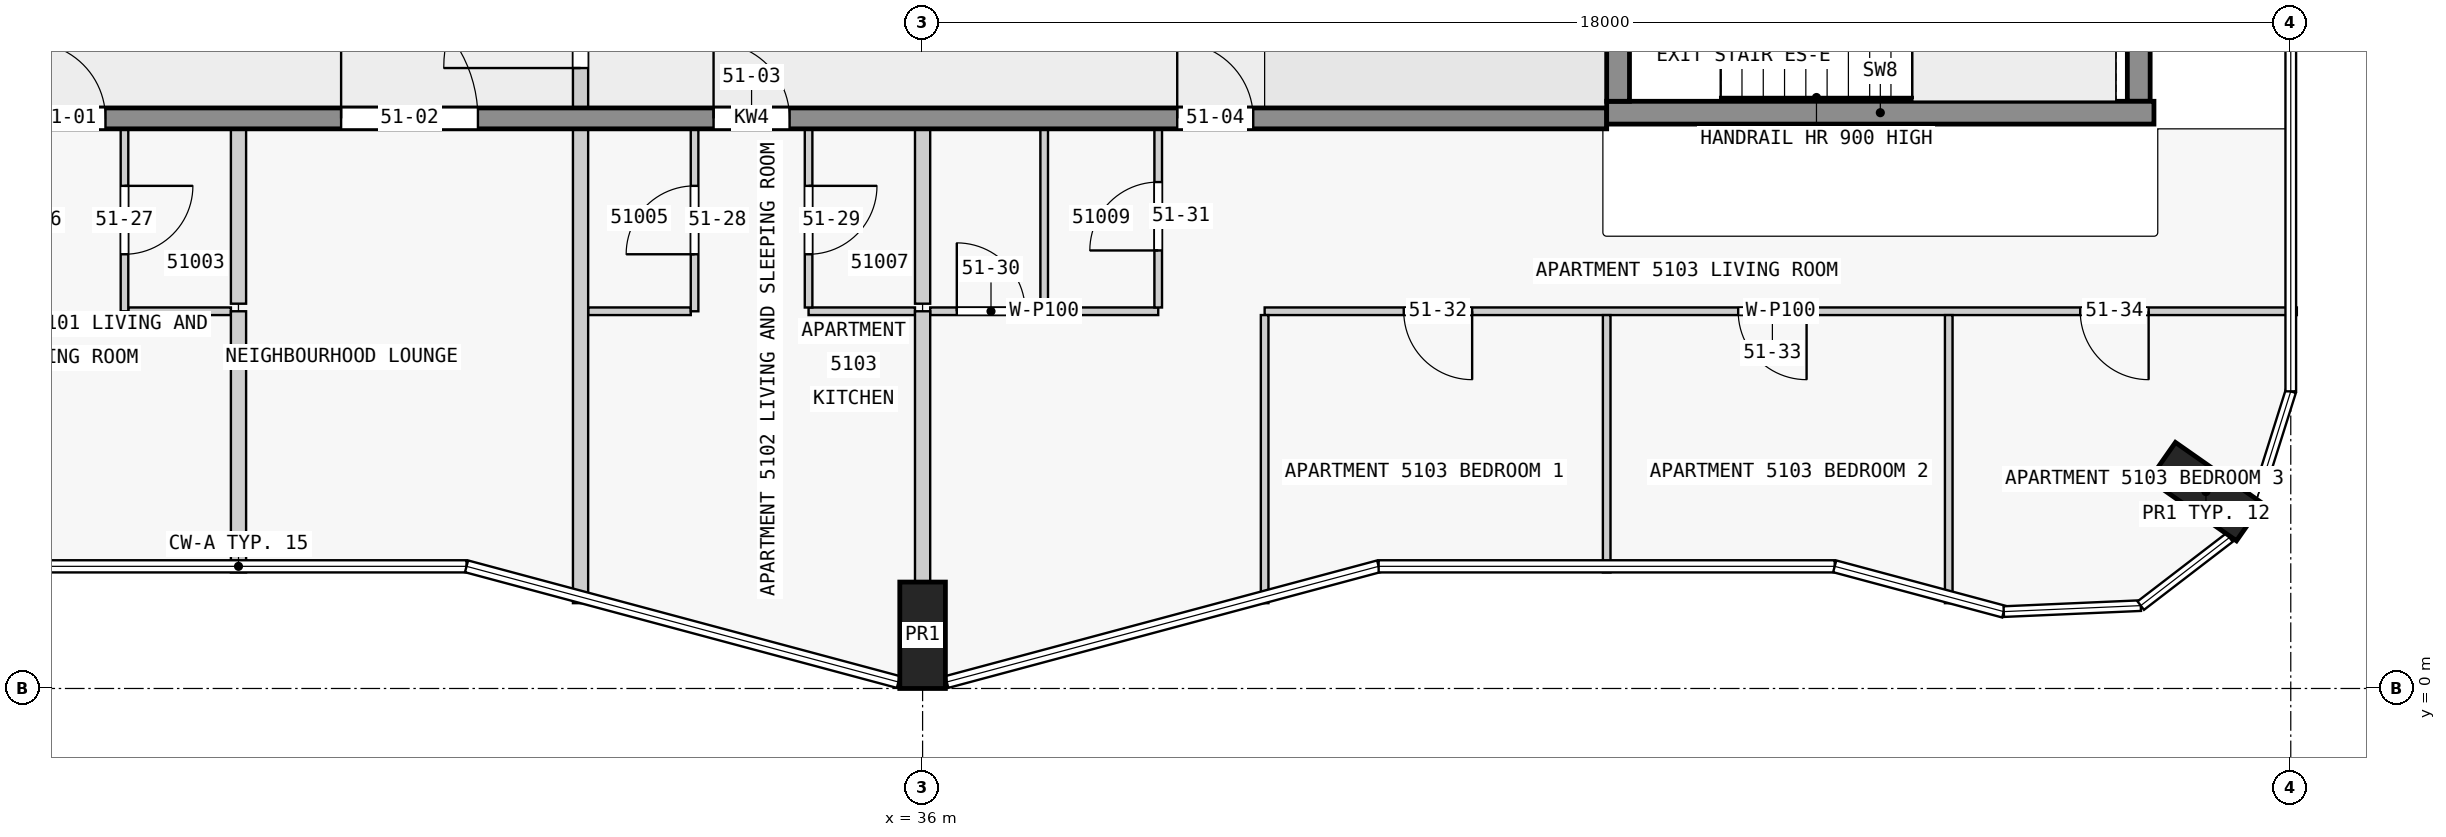
"""IFC4 building model, lengths in metres.
Left out: names, types, materials, properties, quantities, classifications, styles, units other than length and angle.
Written with IfcOpenShell. Run it as: python <this file> out.ifc"""

import sys

from ifc_helpers import new_model, si_unit, direction, frame, frame_2d, origin, origin_2d, place, context, subcontext, project, spatial, rectangle, extrude, element, fill, save


model = new_model("IFC4")
c1 = context("Model", 3, precision=1e-05, world=origin(), true_north=direction((0.0, 1.0)))
c2 = subcontext(c1, "Body", "Model", "MODEL_VIEW")
j1 = project(units=[si_unit("LENGTHUNIT", "METRE"), si_unit("PLANEANGLEUNIT", "RADIAN")], contexts=[c1])
p1 = place(None, origin())
s1 = spatial("IfcSite", under=j1, at=p1, CompositionType="ELEMENT")
p2 = place(p1, origin())
s2 = spatial("IfcBuilding", under=s1, at=p2, CompositionType="ELEMENT")
p3 = place(p2, frame((0.0, 0.0, 197.9)))
s3 = spatial("IfcBuildingStorey", under=s2, at=p3, CompositionType="ELEMENT", Elevation=197.9)
for number, where, z_axis, x_axis in (
    (1, (36.0, 0.7, 0.0), (0.0, 0.0, 1.0), (1.0, 0.0, 0.0)),
    (2, (52.884, 2.59, 0.0), (0.0, 0.0, 1.0), (0.574, 0.819, 0.0)),
):
    element("IfcColumn", number, at=place(p3, frame(where, z_axis=z_axis, x_axis=x_axis)), inside=s3, PredefinedType="COLUMN", context=c2, shape_type="SweptSolid", body=[
        extrude(rectangle(XDim=0.6, YDim=1.4, at=origin_2d()), origin(), (0.0, 0.0, 1.0), 3.5),
    ])
p4 = place(p3, frame((45.15, 7.725, 0.0), z_axis=(0.0, 0.0, 1.0), x_axis=(0.0, 1.0, 0.0)))
e3 = element("IfcWall", 3, at=p4, inside=s3, PredefinedType="SHEAR", context=c2, shape_type="SweptSolid", body=[
    extrude(rectangle(XDim=2.55, YDim=0.3, at=frame_2d((1.275, 0.0))), origin(), (0.0, 0.0, 1.0), 3.5),
])
p5 = place(p4, frame((0.725, 0.0, 0.0)))
e4 = element("IfcOpeningElement", 4, at=p5, cuts=e3, PredefinedType="OPENING", context=c2, shape_type="SweptSolid", body=[
    extrude(rectangle(XDim=1.1, YDim=2.1, at=frame_2d((0.55, 1.05))), frame((0.0, 0.16, 0.0), z_axis=(0.0, -1.0, 0.0), x_axis=(1.0, 0.0, 0.0)), (0.0, 0.0, 1.0), 0.32),
])
p6 = place(p3, frame((52.0, 7.725, 0.0), z_axis=(0.0, 0.0, 1.0), x_axis=(0.0, 1.0, 0.0)))
e5 = element("IfcWall", 5, at=p6, inside=s3, PredefinedType="SHEAR", context=c2, shape_type="SweptSolid", body=[
    extrude(rectangle(XDim=2.55, YDim=0.3, at=frame_2d((1.275, 0.0))), origin(), (0.0, 0.0, 1.0), 3.5),
])
p7 = place(p3, frame((45.0, 7.575, 0.0), z_axis=(0.0, 0.0, 1.0), x_axis=(1.0, 0.0, 0.0)))
e6 = element("IfcWall", 6, at=p7, inside=s3, PredefinedType="SHEAR", context=c2, shape_type="SweptSolid", body=[
    extrude(rectangle(XDim=7.2, YDim=0.3, at=frame_2d((3.6, 0.0))), origin(), (0.0, 0.0, 1.0), 3.5),
])
p8 = place(p3, frame((22.5, 7.5, 0.0), z_axis=(0.0, 0.0, 1.0), x_axis=(1.0, 0.0, 0.0)))
e7 = element("IfcWall", 7, at=p8, inside=s3, PredefinedType="SHEAR", context=c2, shape_type="SweptSolid", body=[
    extrude(rectangle(XDim=22.5, YDim=0.275, at=frame_2d((11.25, 0.0))), origin(), (0.0, 0.0, 1.0), 3.25),
])
p9 = place(p8, frame((1.75, 0.0, 0.0)))
e8 = element("IfcOpeningElement", 8, at=p9, cuts=e7, PredefinedType="OPENING", context=c2, shape_type="SweptSolid", body=[
    extrude(rectangle(XDim=1.0, YDim=2.1, at=frame_2d((0.5, 1.05))), frame((0.0, 0.147, 0.0), z_axis=(0.0, -1.0, 0.0), x_axis=(1.0, 0.0, 0.0)), (0.0, 0.0, 1.0), 0.295),
])
p10 = place(p8, frame((5.85, 0.0, 0.0)))
e9 = element("IfcOpeningElement", 9, at=p10, cuts=e7, PredefinedType="OPENING", context=c2, shape_type="SweptSolid", body=[
    extrude(rectangle(XDim=1.8, YDim=2.1, at=frame_2d((0.9, 1.05))), frame((0.0, 0.147, 0.0), z_axis=(0.0, -1.0, 0.0), x_axis=(1.0, 0.0, 0.0)), (0.0, 0.0, 1.0), 0.295),
])
p11 = place(p8, frame((10.75, 0.0, 0.0)))
e10 = element("IfcOpeningElement", 10, at=p11, cuts=e7, PredefinedType="OPENING", context=c2, shape_type="SweptSolid", body=[
    extrude(rectangle(XDim=1.0, YDim=2.1, at=frame_2d((0.5, 1.05))), frame((0.0, 0.147, 0.0), z_axis=(0.0, -1.0, 0.0), x_axis=(1.0, 0.0, 0.0)), (0.0, 0.0, 1.0), 0.295),
])
p12 = place(p8, frame((16.85, 0.0, 0.0)))
e11 = element("IfcOpeningElement", 11, at=p12, cuts=e7, PredefinedType="OPENING", context=c2, shape_type="SweptSolid", body=[
    extrude(rectangle(XDim=1.0, YDim=2.1, at=frame_2d((0.5, 1.05))), frame((0.0, 0.147, 0.0), z_axis=(0.0, -1.0, 0.0), x_axis=(1.0, 0.0, 0.0)), (0.0, 0.0, 1.0), 0.295),
])
p13 = place(p3, frame((54.08, 4.962, 0.0), z_axis=(0.0, 0.0, 1.0), x_axis=(-1.0, 0.0, 0.0)))
e12 = element("IfcWall", 12, at=p13, inside=s3, PredefinedType="PARTITIONING", context=c2, shape_type="SweptSolid", body=[
    extrude(rectangle(XDim=13.58, YDim=0.1, at=frame_2d((6.79, 0.0))), origin(), (0.0, 0.0, 1.0), 3.25),
])
p14 = place(p13, frame((10.85, 0.0, 0.0)))
e13 = element("IfcOpeningElement", 13, at=p14, cuts=e12, PredefinedType="OPENING", context=c2, shape_type="SweptSolid", body=[
    extrude(rectangle(XDim=0.9, YDim=2.1, at=frame_2d((0.45, 1.05))), frame((0.0, 0.06, 0.0), z_axis=(0.0, -1.0, 0.0), x_axis=(1.0, 0.0, 0.0)), (0.0, 0.0, 1.0), 0.12),
])
p15 = place(p13, frame((6.45, 0.0, 0.0)))
e14 = element("IfcOpeningElement", 14, at=p15, cuts=e12, PredefinedType="OPENING", context=c2, shape_type="SweptSolid", body=[
    extrude(rectangle(XDim=0.9, YDim=2.1, at=frame_2d((0.45, 1.05))), frame((0.0, 0.06, 0.0), z_axis=(0.0, -1.0, 0.0), x_axis=(1.0, 0.0, 0.0)), (0.0, 0.0, 1.0), 0.12),
])
p16 = place(p13, frame((1.95, 0.0, 0.0)))
e15 = element("IfcOpeningElement", 15, at=p16, cuts=e12, PredefinedType="OPENING", context=c2, shape_type="SweptSolid", body=[
    extrude(rectangle(XDim=0.9, YDim=2.1, at=frame_2d((0.45, 1.05))), frame((0.0, 0.06, 0.0), z_axis=(0.0, -1.0, 0.0), x_axis=(1.0, 0.0, 0.0)), (0.0, 0.0, 1.0), 0.12),
])
for number, where, z_axis, x_axis in (
    (16, (25.55, 4.962, 0.0), (0.0, 0.0, 1.0), (1.0, 0.0, 0.0)),
    (17, (31.6, 4.962, 0.0), (0.0, 0.0, 1.0), (1.0, 0.0, 0.0)),
):
    element("IfcWall", number, at=place(p3, frame(where, z_axis=z_axis, x_axis=x_axis)), inside=s3, PredefinedType="PARTITIONING", context=c2, shape_type="SweptSolid", body=[
        extrude(rectangle(XDim=1.35, YDim=0.1, at=frame_2d((0.675, 0.0))), origin(), (0.0, 0.0, 1.0), 3.25),
    ])
p17 = place(p3, frame((34.5, 4.962, 0.0), z_axis=(0.0, 0.0, 1.0), x_axis=(1.0, 0.0, 0.0)))
e18 = element("IfcWall", 18, at=p17, inside=s3, PredefinedType="PARTITIONING", context=c2, shape_type="SweptSolid", body=[
    extrude(rectangle(XDim=1.4, YDim=0.1, at=frame_2d((0.7, 0.0))), origin(), (0.0, 0.0, 1.0), 3.25),
])
p18 = place(p3, frame((36.1, 4.962, 0.0), z_axis=(0.0, 0.0, 1.0), x_axis=(1.0, 0.0, 0.0)))
e19 = element("IfcWall", 19, at=p18, inside=s3, PredefinedType="PARTITIONING", context=c2, shape_type="SweptSolid", body=[
    extrude(rectangle(XDim=3.0, YDim=0.1, at=frame_2d((1.5, 0.0))), origin(), (0.0, 0.0, 1.0), 3.25),
])
p19 = place(p18, frame((0.35, 0.0, 0.0)))
e20 = element("IfcOpeningElement", 20, at=p19, cuts=e19, PredefinedType="OPENING", context=c2, shape_type="SweptSolid", body=[
    extrude(rectangle(XDim=0.9, YDim=2.1, at=frame_2d((0.45, 1.05))), frame((0.0, 0.06, 0.0), z_axis=(0.0, -1.0, 0.0), x_axis=(1.0, 0.0, 0.0)), (0.0, 0.0, 1.0), 0.12),
])
p20 = place(p3, frame((25.5, 7.363, 0.0), z_axis=(0.0, 0.0, 1.0), x_axis=(0.0, -1.0, 0.0)))
e21 = element("IfcWall", 21, at=p20, inside=s3, PredefinedType="PARTITIONING", context=c2, shape_type="SweptSolid", body=[
    extrude(rectangle(XDim=2.4, YDim=0.1, at=frame_2d((1.2, 0.0))), origin(), (0.0, 0.0, 1.0), 3.25),
])
p21 = place(p20, frame((0.75, 0.0, 0.0)))
e22 = element("IfcOpeningElement", 22, at=p21, cuts=e21, PredefinedType="OPENING", context=c2, shape_type="SweptSolid", body=[
    extrude(rectangle(XDim=0.9, YDim=2.1, at=frame_2d((0.45, 1.05))), frame((0.0, 0.06, 0.0), z_axis=(0.0, -1.0, 0.0), x_axis=(1.0, 0.0, 0.0)), (0.0, 0.0, 1.0), 0.12),
])
p22 = place(p3, frame((27.0, 4.962, 0.0), z_axis=(0.0, 0.0, 1.0), x_axis=(0.0, -1.0, 0.0)))
e23 = element("IfcWall", 23, at=p22, inside=s3, PredefinedType="PARTITIONING", context=c2, shape_type="SweptSolid", body=[
    extrude(rectangle(XDim=3.436, YDim=0.2, at=frame_2d((1.718, 0.0))), origin(), (0.0, 0.0, 1.0), 3.25),
])
p23 = place(p3, frame((27.0, 5.062, 0.0), z_axis=(0.0, 0.0, 1.0), x_axis=(0.0, 1.0, 0.0)))
e24 = element("IfcWall", 24, at=p23, inside=s3, PredefinedType="PARTITIONING", context=c2, shape_type="SweptSolid", body=[
    extrude(rectangle(XDim=2.3, YDim=0.2, at=frame_2d((1.15, 0.0))), origin(), (0.0, 0.0, 1.0), 3.25),
])
p24 = place(p3, frame((31.5, 1.122, 0.0), z_axis=(0.0, 0.0, 1.0), x_axis=(0.0, 1.0, 0.0)))
e25 = element("IfcWall", 25, at=p24, inside=s3, PredefinedType="PARTITIONING", context=c2, shape_type="SweptSolid", body=[
    extrude(rectangle(XDim=6.24, YDim=0.2, at=frame_2d((3.12, 0.0))), origin(), (0.0, 0.0, 1.0), 3.25),
])
p25 = place(p3, frame((33.0, 4.962, 0.0), z_axis=(0.0, 0.0, 1.0), x_axis=(0.0, 1.0, 0.0)))
e26 = element("IfcWall", 26, at=p25, inside=s3, PredefinedType="PARTITIONING", context=c2, shape_type="SweptSolid", body=[
    extrude(rectangle(XDim=2.4, YDim=0.1, at=frame_2d((1.2, 0.0))), origin(), (0.0, 0.0, 1.0), 3.25),
])
p26 = place(p25, frame((0.75, 0.0, 0.0)))
e27 = element("IfcOpeningElement", 27, at=p26, cuts=e26, PredefinedType="OPENING", context=c2, shape_type="SweptSolid", body=[
    extrude(rectangle(XDim=0.9, YDim=2.1, at=frame_2d((0.45, 1.05))), frame((0.0, 0.06, 0.0), z_axis=(0.0, -1.0, 0.0), x_axis=(1.0, 0.0, 0.0)), (0.0, 0.0, 1.0), 0.12),
])
p27 = place(p3, frame((34.5, 7.363, 0.0), z_axis=(0.0, 0.0, 1.0), x_axis=(0.0, -1.0, 0.0)))
e28 = element("IfcWall", 28, at=p27, inside=s3, PredefinedType="PARTITIONING", context=c2, shape_type="SweptSolid", body=[
    extrude(rectangle(XDim=2.35, YDim=0.1, at=frame_2d((1.175, 0.0))), origin(), (0.0, 0.0, 1.0), 3.25),
])
p28 = place(p27, frame((0.75, 0.0, 0.0)))
e29 = element("IfcOpeningElement", 29, at=p28, cuts=e28, PredefinedType="OPENING", context=c2, shape_type="SweptSolid", body=[
    extrude(rectangle(XDim=0.9, YDim=2.1, at=frame_2d((0.45, 1.05))), frame((0.0, 0.06, 0.0), z_axis=(0.0, -1.0, 0.0), x_axis=(1.0, 0.0, 0.0)), (0.0, 0.0, 1.0), 0.12),
])
p29 = place(p3, frame((36.0, 4.962, 0.0), z_axis=(0.0, 0.0, 1.0), x_axis=(0.0, -1.0, 0.0)))
e30 = element("IfcWall", 30, at=p29, inside=s3, PredefinedType="PARTITIONING", context=c2, shape_type="SweptSolid", body=[
    extrude(rectangle(XDim=3.562, YDim=0.2, at=frame_2d((1.781, 0.0))), origin(), (0.0, 0.0, 1.0), 3.25),
])
p30 = place(p3, frame((36.0, 5.062, 0.0), z_axis=(0.0, 0.0, 1.0), x_axis=(0.0, 1.0, 0.0)))
e31 = element("IfcWall", 31, at=p30, inside=s3, PredefinedType="PARTITIONING", context=c2, shape_type="SweptSolid", body=[
    extrude(rectangle(XDim=2.3, YDim=0.2, at=frame_2d((1.15, 0.0))), origin(), (0.0, 0.0, 1.0), 3.25),
])
p31 = place(p3, frame((37.6, 5.012, 0.0), z_axis=(0.0, 0.0, 1.0), x_axis=(0.0, 1.0, 0.0)))
e32 = element("IfcWall", 32, at=p31, inside=s3, PredefinedType="PARTITIONING", context=c2, shape_type="SweptSolid", body=[
    extrude(rectangle(XDim=2.35, YDim=0.1, at=frame_2d((1.175, 0.0))), origin(), (0.0, 0.0, 1.0), 3.25),
])
p32 = place(p3, frame((39.1, 5.012, 0.0), z_axis=(0.0, 0.0, 1.0), x_axis=(0.0, 1.0, 0.0)))
e33 = element("IfcWall", 33, at=p32, inside=s3, PredefinedType="PARTITIONING", context=c2, shape_type="SweptSolid", body=[
    extrude(rectangle(XDim=2.35, YDim=0.1, at=frame_2d((1.175, 0.0))), origin(), (0.0, 0.0, 1.0), 3.25),
])
p33 = place(p32, frame((0.75, 0.0, 0.0)))
e34 = element("IfcOpeningElement", 34, at=p33, cuts=e33, PredefinedType="OPENING", context=c2, shape_type="SweptSolid", body=[
    extrude(rectangle(XDim=0.9, YDim=2.1, at=frame_2d((0.45, 1.05))), frame((0.0, 0.06, 0.0), z_axis=(0.0, -1.0, 0.0), x_axis=(1.0, 0.0, 0.0)), (0.0, 0.0, 1.0), 0.12),
])
p34 = place(p3, frame((40.5, 4.913, 0.0), z_axis=(0.0, 0.0, 1.0), x_axis=(0.0, -1.0, 0.0)))
e35 = element("IfcWall", 35, at=p34, inside=s3, PredefinedType="PARTITIONING", context=c2, shape_type="SweptSolid", body=[
    extrude(rectangle(XDim=3.79, YDim=0.1, at=frame_2d((1.895, 0.0))), origin(), (0.0, 0.0, 1.0), 3.25),
])
p35 = place(p3, frame((45.0, 1.527, 0.0), z_axis=(0.0, 0.0, 1.0), x_axis=(0.0, 1.0, 0.0)))
e36 = element("IfcWall", 36, at=p35, inside=s3, PredefinedType="PARTITIONING", context=c2, shape_type="SweptSolid", body=[
    extrude(rectangle(XDim=3.386, YDim=0.1, at=frame_2d((1.693, 0.0))), origin(), (0.0, 0.0, 1.0), 3.25),
])
p36 = place(p3, frame((49.5, 1.122, 0.0), z_axis=(0.0, 0.0, 1.0), x_axis=(0.0, 1.0, 0.0)))
e37 = element("IfcWall", 37, at=p36, inside=s3, PredefinedType="PARTITIONING", context=c2, shape_type="SweptSolid", body=[
    extrude(rectangle(XDim=3.79, YDim=0.1, at=frame_2d((1.895, 0.0))), origin(), (0.0, 0.0, 1.0), 3.25),
])
p37 = place(p3, frame((31.5, 7.462, 0.0), z_axis=(0.0, 0.0, 1.0), x_axis=(0.0, 1.0, 0.0)))
e38 = element("IfcWall", 38, at=p37, inside=s3, PredefinedType="PARTITIONING", context=c2, shape_type="SweptSolid", body=[
    extrude(rectangle(XDim=3.175, YDim=0.2, at=frame_2d((1.587, 0.0))), origin(), (0.0, 0.0, 1.0), 3.25),
])
p38 = place(p37, frame((0.7, 0.0, 0.0)))
e39 = element("IfcOpeningElement", 39, at=p38, cuts=e38, PredefinedType="OPENING", context=c2, shape_type="SweptSolid", body=[
    extrude(rectangle(XDim=1.8, YDim=2.1, at=frame_2d((0.9, 1.05))), frame((0.0, 0.11, 0.0), z_axis=(0.0, -1.0, 0.0), x_axis=(1.0, 0.0, 0.0)), (0.0, 0.0, 1.0), 0.22),
])
p39 = place(p9, origin())
e40 = element("IfcDoor", 40, at=p39, inside=s3, OperationType="SINGLE_SWING_LEFT", PredefinedType="DOOR", context=c2, shape_type="SweptSolid", body=[
    extrude(rectangle(XDim=1.0, YDim=2.1, at=frame_2d((0.5, 1.05))), frame((0.0, 0.025, 0.0), z_axis=(0.0, -1.0, 0.0), x_axis=(1.0, 0.0, 0.0)), (0.0, 0.0, 1.0), 0.05),
])
fill(e8, e40)
p40 = place(p10, origin())
e41 = element("IfcDoor", 41, at=p40, inside=s3, OperationType="SINGLE_SWING_LEFT", PredefinedType="DOOR", context=c2, shape_type="SweptSolid", body=[
    extrude(rectangle(XDim=1.8, YDim=2.1, at=frame_2d((0.9, 1.05))), frame((0.0, 0.025, 0.0), z_axis=(0.0, -1.0, 0.0), x_axis=(1.0, 0.0, 0.0)), (0.0, 0.0, 1.0), 0.05),
])
fill(e9, e41)
p41 = place(p11, origin())
e42 = element("IfcDoor", 42, at=p41, inside=s3, OperationType="SINGLE_SWING_LEFT", PredefinedType="DOOR", context=c2, shape_type="SweptSolid", body=[
    extrude(rectangle(XDim=1.0, YDim=2.1, at=frame_2d((0.5, 1.05))), frame((0.0, 0.025, 0.0), z_axis=(0.0, -1.0, 0.0), x_axis=(1.0, 0.0, 0.0)), (0.0, 0.0, 1.0), 0.05),
])
fill(e10, e42)
p42 = place(p12, origin())
e43 = element("IfcDoor", 43, at=p42, inside=s3, OperationType="SINGLE_SWING_RIGHT", PredefinedType="DOOR", context=c2, shape_type="SweptSolid", body=[
    extrude(rectangle(XDim=1.0, YDim=2.1, at=frame_2d((0.5, 1.05))), frame((0.0, 0.025, 0.0), z_axis=(0.0, -1.0, 0.0), x_axis=(1.0, 0.0, 0.0)), (0.0, 0.0, 1.0), 0.05),
])
fill(e11, e43)
p43 = place(p38, origin())
e44 = element("IfcDoor", 44, at=p43, inside=s3, OperationType="SINGLE_SWING_RIGHT", PredefinedType="DOOR", context=c2, shape_type="SweptSolid", body=[
    extrude(rectangle(XDim=1.8, YDim=2.1, at=frame_2d((0.9, 1.05))), frame((0.0, 0.025, 0.0), z_axis=(0.0, -1.0, 0.0), x_axis=(1.0, 0.0, 0.0)), (0.0, 0.0, 1.0), 0.05),
])
fill(e39, e44)
p44 = place(p21, origin())
e45 = element("IfcDoor", 45, at=p44, inside=s3, OperationType="SINGLE_SWING_RIGHT", PredefinedType="DOOR", context=c2, shape_type="SweptSolid", body=[
    extrude(rectangle(XDim=0.9, YDim=2.1, at=frame_2d((0.45, 1.05))), frame((0.0, 0.025, 0.0), z_axis=(0.0, -1.0, 0.0), x_axis=(1.0, 0.0, 0.0)), (0.0, 0.0, 1.0), 0.05),
])
fill(e22, e45)
p45 = place(p26, origin())
e46 = element("IfcDoor", 46, at=p45, inside=s3, OperationType="SINGLE_SWING_RIGHT", PredefinedType="DOOR", context=c2, shape_type="SweptSolid", body=[
    extrude(rectangle(XDim=0.9, YDim=2.1, at=frame_2d((0.45, 1.05))), frame((0.0, 0.025, 0.0), z_axis=(0.0, -1.0, 0.0), x_axis=(1.0, 0.0, 0.0)), (0.0, 0.0, 1.0), 0.05),
])
fill(e27, e46)
p46 = place(p28, origin())
e47 = element("IfcDoor", 47, at=p46, inside=s3, OperationType="SINGLE_SWING_RIGHT", PredefinedType="DOOR", context=c2, shape_type="SweptSolid", body=[
    extrude(rectangle(XDim=0.9, YDim=2.1, at=frame_2d((0.45, 1.05))), frame((0.0, 0.025, 0.0), z_axis=(0.0, -1.0, 0.0), x_axis=(1.0, 0.0, 0.0)), (0.0, 0.0, 1.0), 0.05),
])
fill(e29, e47)
p47 = place(p19, origin())
e48 = element("IfcDoor", 48, at=p47, inside=s3, OperationType="SINGLE_SWING_LEFT", PredefinedType="DOOR", context=c2, shape_type="SweptSolid", body=[
    extrude(rectangle(XDim=0.9, YDim=2.1, at=frame_2d((0.45, 1.05))), frame((0.0, 0.025, 0.0), z_axis=(0.0, -1.0, 0.0), x_axis=(1.0, 0.0, 0.0)), (0.0, 0.0, 1.0), 0.05),
])
fill(e20, e48)
p48 = place(p33, origin())
e49 = element("IfcDoor", 49, at=p48, inside=s3, OperationType="SINGLE_SWING_RIGHT", PredefinedType="DOOR", context=c2, shape_type="SweptSolid", body=[
    extrude(rectangle(XDim=0.9, YDim=2.1, at=frame_2d((0.45, 1.05))), frame((0.0, 0.025, 0.0), z_axis=(0.0, -1.0, 0.0), x_axis=(1.0, 0.0, 0.0)), (0.0, 0.0, 1.0), 0.05),
])
fill(e34, e49)
p49 = place(p14, origin())
e50 = element("IfcDoor", 50, at=p49, inside=s3, OperationType="SINGLE_SWING_RIGHT", PredefinedType="DOOR", context=c2, shape_type="SweptSolid", body=[
    extrude(rectangle(XDim=0.9, YDim=2.1, at=frame_2d((0.45, 1.05))), frame((0.0, 0.025, 0.0), z_axis=(0.0, -1.0, 0.0), x_axis=(1.0, 0.0, 0.0)), (0.0, 0.0, 1.0), 0.05),
])
fill(e13, e50)
p50 = place(p15, origin())
e51 = element("IfcDoor", 51, at=p50, inside=s3, OperationType="SINGLE_SWING_RIGHT", PredefinedType="DOOR", context=c2, shape_type="SweptSolid", body=[
    extrude(rectangle(XDim=0.9, YDim=2.1, at=frame_2d((0.45, 1.05))), frame((0.0, 0.025, 0.0), z_axis=(0.0, -1.0, 0.0), x_axis=(1.0, 0.0, 0.0)), (0.0, 0.0, 1.0), 0.05),
])
fill(e14, e51)
p51 = place(p16, origin())
e52 = element("IfcDoor", 52, at=p51, inside=s3, OperationType="SINGLE_SWING_LEFT", PredefinedType="DOOR", context=c2, shape_type="SweptSolid", body=[
    extrude(rectangle(XDim=0.9, YDim=2.1, at=frame_2d((0.45, 1.05))), frame((0.0, 0.025, 0.0), z_axis=(0.0, -1.0, 0.0), x_axis=(1.0, 0.0, 0.0)), (0.0, 0.0, 1.0), 0.05),
])
fill(e15, e52)
save(model, sys.argv[1])
